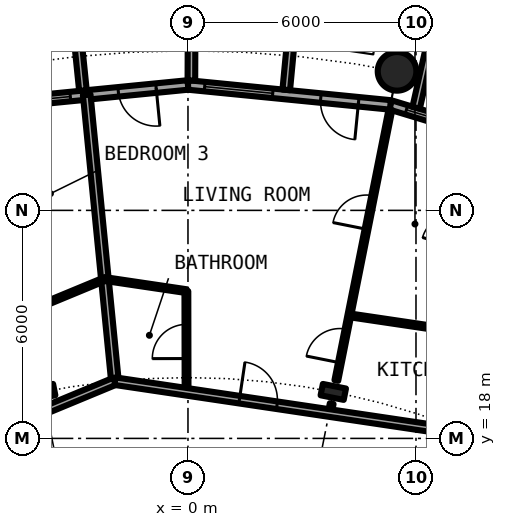
"""IFC4 building model, lengths in metres.
Left out: names, types, materials, properties, quantities, classifications, styles, units other than length and angle.
Written with IfcOpenShell. Run it as: python <this file> out.ifc"""

import sys

from ifc_helpers import new_model, si_unit, direction, frame, frame_2d, origin, origin_2d, place, context, subcontext, project, spatial, rectangle, hollow_circle, i_section, extrude, element, fill, save


model = new_model("IFC4")
c1 = context("Model", 3, precision=1e-05, world=origin(), true_north=direction((0.0, 1.0)))
c2 = subcontext(c1, "Body", "Model", "MODEL_VIEW")
j1 = project(units=[si_unit("LENGTHUNIT", "METRE"), si_unit("PLANEANGLEUNIT", "RADIAN")], contexts=[c1])
p1 = place(None, origin())
s1 = spatial("IfcSite", under=j1, at=p1, CompositionType="ELEMENT")
p2 = place(p1, origin())
s2 = spatial("IfcBuilding", under=s1, at=p2, CompositionType="ELEMENT")
p3 = place(p2, frame((0.0, 0.0, 50.25)))
s3 = spatial("IfcBuildingStorey", under=s2, at=p3, CompositionType="ELEMENT", Elevation=50.25)
p4 = place(p3, frame((5.501, 27.658, 0.0), z_axis=(0.0, 0.0, 1.0), x_axis=(1.0, 0.0, 0.0)))
e1 = element("IfcColumn", 1, at=p4, inside=s3, PredefinedType="COLUMN", context=c2, shape_type="SweptSolid", body=[
    extrude(hollow_circle(Radius=0.508, WallThickness=0.05, at=origin_2d()), origin(), (0.0, 0.0, 1.0), 3.05),
])
for number, where, z_axis, x_axis in (
    (2, (3.824, 19.223, 0.0), (0.0, 0.0, 1.0), (0.195, 0.981, 0.0)),
    (3, (-3.824, 19.223, 0.0), (0.0, 0.0, 1.0), (-0.195, 0.981, 0.0)),
):
    element("IfcColumn", number, at=place(p3, frame(where, z_axis=z_axis, x_axis=x_axis)), inside=s3, PredefinedType="COLUMN", context=c2, shape_type="SweptSolid", body=[
        extrude(i_section(OverallWidth=0.305, OverallDepth=0.62, WebThickness=0.021, FlangeThickness=0.04, FilletRadius=0.027, at=origin_2d()), origin(), (0.0, 0.0, 1.0), 3.05),
    ])
p5 = place(p3, frame((10.447, 25.222, 0.0), z_axis=(0.0, 0.0, 1.0), x_axis=(-0.956965678721, 0.290201119486, 0.0)))
e4 = element("IfcWall", 4, at=p5, inside=s3, PredefinedType="SOLIDWALL", context=c2, shape_type="SweptSolid", body=[
    extrude(rectangle(XDim=5.351, YDim=0.25, at=frame_2d((2.676, 0.0))), origin(), (0.0, 0.0, 1.0), 2.7),
])
p6 = place(p5, frame((0.841, 0.0, 0.0)))
e5 = element("IfcOpeningElement", 5, at=p6, cuts=e4, PredefinedType="OPENING", context=c2, shape_type="SweptSolid", body=[
    extrude(rectangle(XDim=1.0, YDim=2.2, at=frame_2d((0.5, 1.1))), frame((0.0, 0.135, 0.0), z_axis=(0.0, -1.0, 0.0), x_axis=(1.0, 0.0, 0.0)), (0.0, 0.0, 1.0), 0.27),
])
p7 = place(p5, frame((3.111, 0.0, 0.3)))
e6 = element("IfcOpeningElement", 6, at=p7, cuts=e4, PredefinedType="OPENING", context=c2, shape_type="SweptSolid", body=[
    extrude(rectangle(XDim=1.8, YDim=2.1, at=frame_2d((0.9, 1.05))), frame((0.0, 0.135, 0.0), z_axis=(0.0, -1.0, 0.0), x_axis=(1.0, 0.0, 0.0)), (0.0, 0.0, 1.0), 0.27),
])
p8 = place(p3, frame((6.004, 26.7, -0.03), z_axis=(0.0, 0.0, 1.0), x_axis=(0.219609259383, 0.975587911566, 0.0)))
e7 = element("IfcWall", 7, at=p8, inside=s3, PredefinedType="SOLIDWALL", context=c2, shape_type="SweptSolid", body=[
    extrude(rectangle(XDim=2.933, YDim=0.2, at=frame_2d((1.466, 0.0))), origin(), (0.0, 0.0, 1.0), 2.73),
])
p9 = place(p3, frame((5.326, 26.775, 0.0), z_axis=(0.0, 0.0, 1.0), x_axis=(-0.995173996315, 0.098126026407, 0.0)))
e8 = element("IfcWall", 8, at=p9, inside=s3, PredefinedType="SOLIDWALL", context=c2, shape_type="SweptSolid", body=[
    extrude(rectangle(XDim=5.352, YDim=0.25, at=frame_2d((2.676, 0.0))), origin(), (0.0, 0.0, 1.0), 2.7),
])
p10 = place(p9, frame((0.841, 0.0, 0.0)))
e9 = element("IfcOpeningElement", 9, at=p10, cuts=e8, PredefinedType="OPENING", context=c2, shape_type="SweptSolid", body=[
    extrude(rectangle(XDim=1.0, YDim=2.2, at=frame_2d((0.5, 1.1))), frame((0.0, 0.135, 0.0), z_axis=(0.0, -1.0, 0.0), x_axis=(1.0, 0.0, 0.0)), (0.0, 0.0, 1.0), 0.27),
])
p11 = place(p9, frame((3.111, 0.0, 0.3)))
e10 = element("IfcOpeningElement", 10, at=p11, cuts=e8, PredefinedType="OPENING", context=c2, shape_type="SweptSolid", body=[
    extrude(rectangle(XDim=1.8, YDim=2.1, at=frame_2d((0.9, 1.05))), frame((0.0, 0.135, 0.0), z_axis=(0.0, -1.0, 0.0), x_axis=(1.0, 0.0, 0.0)), (0.0, 0.0, 1.0), 0.27),
])
p12 = place(p3, frame((2.586, 27.171, -0.03), z_axis=(0.0, 0.0, 1.0), x_axis=(0.094548432284, 0.995520262954, 0.0)))
e11 = element("IfcWall", 11, at=p12, inside=s3, PredefinedType="SOLIDWALL", context=c2, shape_type="SweptSolid", body=[
    extrude(rectangle(XDim=3.006, YDim=0.2, at=frame_2d((1.503, 0.0))), origin(), (0.0, 0.0, 1.0), 2.73),
])
p13 = place(p3, frame((0.09, 27.417, -0.03), z_axis=(0.0, 0.0, 1.0), x_axis=(0.00347308367, 0.999993968827, 0.0)))
e12 = element("IfcWall", 12, at=p13, inside=s3, PredefinedType="SOLIDWALL", context=c2, shape_type="SweptSolid", body=[
    extrude(rectangle(XDim=2.882, YDim=0.2, at=frame_2d((1.441, 0.0))), origin(), (0.0, 0.0, 1.0), 2.73),
])
p14 = place(p3, frame((0.0, 27.3, 0.0), z_axis=(0.0, 0.0, 1.0), x_axis=(-0.995173996315, -0.098126026407, 0.0)))
e13 = element("IfcWall", 13, at=p14, inside=s3, PredefinedType="SOLIDWALL", context=c2, shape_type="SweptSolid", body=[
    extrude(rectangle(XDim=5.352, YDim=0.25, at=frame_2d((2.676, 0.0))), origin(), (0.0, 0.0, 1.0), 2.7),
])
p15 = place(p14, frame((0.841, 0.0, 0.0)))
e14 = element("IfcOpeningElement", 14, at=p15, cuts=e13, PredefinedType="OPENING", context=c2, shape_type="SweptSolid", body=[
    extrude(rectangle(XDim=1.0, YDim=2.2, at=frame_2d((0.5, 1.1))), frame((0.0, 0.135, 0.0), z_axis=(0.0, -1.0, 0.0), x_axis=(1.0, 0.0, 0.0)), (0.0, 0.0, 1.0), 0.27),
])
p16 = place(p14, frame((3.111, 0.0, 0.3)))
e15 = element("IfcOpeningElement", 15, at=p16, cuts=e13, PredefinedType="OPENING", context=c2, shape_type="SweptSolid", body=[
    extrude(rectangle(XDim=1.8, YDim=2.1, at=frame_2d((0.9, 1.05))), frame((0.0, 0.135, 0.0), z_axis=(0.0, -1.0, 0.0), x_axis=(1.0, 0.0, 0.0)), (0.0, 0.0, 1.0), 0.27),
])
p17 = place(p3, frame((-2.764, 27.153, -0.03), z_axis=(0.0, 0.0, 1.0), x_axis=(-0.101505487237, 0.994834979311, 0.0)))
e16 = element("IfcWall", 16, at=p17, inside=s3, PredefinedType="SOLIDWALL", context=c2, shape_type="SweptSolid", body=[
    extrude(rectangle(XDim=3.007, YDim=0.2, at=frame_2d((1.503, 0.0))), origin(), (0.0, 0.0, 1.0), 2.73),
])
p18 = place(p3, frame((-2.665, 27.044, 0.0), z_axis=(0.0, 0.0, 1.0), x_axis=(0.098083473227, -0.99517819122, 0.0)))
e17 = element("IfcWall", 17, at=p18, inside=s3, PredefinedType="PARTITIONING", context=c2, shape_type="SweptSolid", body=[
    extrude(rectangle(XDim=7.574, YDim=0.2, at=frame_2d((3.787, 0.0))), origin(), (0.0, 0.0, 1.0), 2.7),
])
p19 = place(p3, frame((-0.037, 19.226, 0.0), z_axis=(0.0, 0.0, 1.0), x_axis=(-0.001843314841, 0.999998301094, 0.0)))
e18 = element("IfcWall", 18, at=p19, inside=s3, PredefinedType="PARTITIONING", context=c2, shape_type="SweptSolid", body=[
    extrude(rectangle(XDim=2.649, YDim=0.1, at=frame_2d((1.324, 0.0))), origin(), (0.0, 0.0, 1.0), 2.7),
])
p20 = place(p19, frame((0.875, 0.0, 0.0)))
e19 = element("IfcOpeningElement", 19, at=p20, cuts=e18, PredefinedType="OPENING", context=c2, shape_type="SweptSolid", body=[
    extrude(rectangle(XDim=0.9, YDim=2.3, at=frame_2d((0.45, 1.15))), frame((0.0, 0.06, 0.0), z_axis=(0.0, -1.0, 0.0), x_axis=(1.0, 0.0, 0.0)), (0.0, 0.0, 1.0), 0.12),
])
p21 = place(p3, frame((3.733, 18.667, 0.0), z_axis=(0.0, 0.0, 1.0), x_axis=(0.193340656307, 0.981131688724, 0.0)))
e20 = element("IfcWall", 20, at=p21, inside=s3, PredefinedType="PARTITIONING", context=c2, shape_type="SweptSolid", body=[
    extrude(rectangle(XDim=0.254, YDim=0.1, at=frame_2d((0.127, 0.0))), origin(), (0.0, 0.0, 1.0), 2.7),
])
p22 = place(p3, frame((3.904, 19.524, 0.0), z_axis=(0.0, 0.0, 1.0), x_axis=(0.195857618189, 0.980632343642, 0.0)))
e21 = element("IfcWall", 21, at=p22, inside=s3, PredefinedType="PARTITIONING", context=c2, shape_type="SweptSolid", body=[
    extrude(rectangle(XDim=7.265, YDim=0.1, at=frame_2d((3.632, 0.0))), origin(), (0.0, 0.0, 1.0), 2.7),
])
p23 = place(p22, frame((0.476, 0.0, 0.0)))
e22 = element("IfcOpeningElement", 22, at=p23, cuts=e21, PredefinedType="OPENING", context=c2, shape_type="SweptSolid", body=[
    extrude(rectangle(XDim=0.9, YDim=2.3, at=frame_2d((0.45, 1.15))), frame((0.0, 0.06, 0.0), z_axis=(0.0, -1.0, 0.0), x_axis=(1.0, 0.0, 0.0)), (0.0, 0.0, 1.0), 0.12),
])
p24 = place(p22, frame((4.058, 0.0, 0.0)))
e23 = element("IfcOpeningElement", 23, at=p24, cuts=e21, PredefinedType="OPENING", context=c2, shape_type="SweptSolid", body=[
    extrude(rectangle(XDim=0.9, YDim=2.3, at=frame_2d((0.45, 1.15))), frame((0.0, 0.06, 0.0), z_axis=(0.0, -1.0, 0.0), x_axis=(1.0, 0.0, 0.0)), (0.0, 0.0, 1.0), 0.12),
])
p25 = place(p3, frame((-12.435, 15.15, 0.0), z_axis=(0.0, 0.0, 1.0), x_axis=(0.923845560554, 0.38276543763, 0.0)))
e24 = element("IfcWall", 24, at=p25, inside=s3, PredefinedType="PARTITIONING", context=c2, shape_type="SweptSolid", body=[
    extrude(rectangle(XDim=11.381, YDim=0.2, at=frame_2d((5.69, 0.0))), origin(), (0.0, 0.0, 1.0), 2.7),
])
p26 = place(p25, frame((3.293, 0.0, 0.0)))
e25 = element("IfcOpeningElement", 25, at=p26, cuts=e24, PredefinedType="OPENING", context=c2, shape_type="SweptSolid", body=[
    extrude(rectangle(XDim=1.0, YDim=2.3, at=frame_2d((0.5, 1.15))), frame((0.0, 0.11, 0.0), z_axis=(0.0, -1.0, 0.0), x_axis=(1.0, 0.0, 0.0)), (0.0, 0.0, 1.0), 0.22),
])
p27 = place(p3, frame((-1.921, 19.506, 0.0), z_axis=(0.0, 0.0, 1.0), x_axis=(0.989134446023, -0.147013767014, 0.0)))
e26 = element("IfcWall", 26, at=p27, inside=s3, PredefinedType="PARTITIONING", context=c2, shape_type="SweptSolid", body=[
    extrude(rectangle(XDim=9.531, YDim=0.2, at=frame_2d((4.765, 0.0))), origin(), (0.0, 0.0, 1.0), 2.38),
])
p28 = place(p27, frame((3.31, 0.0, 0.0)))
e27 = element("IfcOpeningElement", 27, at=p28, cuts=e26, PredefinedType="OPENING", context=c2, shape_type="SweptSolid", body=[
    extrude(rectangle(XDim=1.0, YDim=2.3, at=frame_2d((0.5, 1.15))), frame((0.0, 0.11, 0.0), z_axis=(0.0, -1.0, 0.0), x_axis=(1.0, 0.0, 0.0)), (0.0, 0.0, 1.0), 0.22),
])
p29 = place(p3, frame((-8.166, 19.715, 0.0), z_axis=(0.0, 0.0, 1.0), x_axis=(0.923844914631, 0.382766996632, 0.0)))
e28 = element("IfcWall", 28, at=p29, inside=s3, PredefinedType="PARTITIONING", context=c2, shape_type="SweptSolid", body=[
    extrude(rectangle(XDim=6.474, YDim=0.1, at=frame_2d((3.237, 0.0))), origin(), (0.0, 0.0, 1.0), 2.7),
])
p30 = place(p3, frame((-2.186, 22.193, 0.0), z_axis=(0.0, 0.0, 1.0), x_axis=(0.989171386505, -0.146765009863, 0.0)))
e29 = element("IfcWall", 29, at=p30, inside=s3, PredefinedType="PARTITIONING", context=c2, shape_type="SweptSolid", body=[
    extrude(rectangle(XDim=2.167, YDim=0.1, at=frame_2d((1.084, 0.0))), origin(), (0.0, 0.0, 1.0), 2.7),
])
p31 = place(p3, frame((4.246, 21.239, 0.0), z_axis=(0.0, 0.0, 1.0), x_axis=(0.989178348771, -0.146718077695, 0.0)))
e30 = element("IfcWall", 30, at=p31, inside=s3, PredefinedType="PARTITIONING", context=c2, shape_type="SweptSolid", body=[
    extrude(rectangle(XDim=4.335, YDim=0.1, at=frame_2d((2.167, 0.0))), origin(), (0.0, 0.0, 1.0), 2.7),
])
p32 = place(p7, origin())
e31 = element("IfcWindow", 31, at=p32, inside=s3, PartitioningType="SINGLE_PANEL", PredefinedType="WINDOW", context=c2, shape_type="SweptSolid", body=[
    extrude(rectangle(XDim=1.8, YDim=2.1, at=frame_2d((0.9, 1.05))), frame((0.0, 0.03, 0.0), z_axis=(0.0, -1.0, 0.0), x_axis=(1.0, 0.0, 0.0)), (0.0, 0.0, 1.0), 0.06),
])
fill(e6, e31)
p33 = place(p10, origin())
e32 = element("IfcDoor", 32, at=p33, inside=s3, OperationType="SINGLE_SWING_LEFT", PredefinedType="DOOR", context=c2, shape_type="SweptSolid", body=[
    extrude(rectangle(XDim=1.0, YDim=2.2, at=frame_2d((0.5, 1.1))), frame((0.0, 0.025, 0.0), z_axis=(0.0, -1.0, 0.0), x_axis=(1.0, 0.0, 0.0)), (0.0, 0.0, 1.0), 0.05),
])
fill(e9, e32)
p34 = place(p11, origin())
e33 = element("IfcWindow", 33, at=p34, inside=s3, PartitioningType="SINGLE_PANEL", PredefinedType="WINDOW", context=c2, shape_type="SweptSolid", body=[
    extrude(rectangle(XDim=1.8, YDim=2.1, at=frame_2d((0.9, 1.05))), frame((0.0, 0.03, 0.0), z_axis=(0.0, -1.0, 0.0), x_axis=(1.0, 0.0, 0.0)), (0.0, 0.0, 1.0), 0.06),
])
fill(e10, e33)
p35 = place(p15, origin())
e34 = element("IfcDoor", 34, at=p35, inside=s3, OperationType="SINGLE_SWING_LEFT", PredefinedType="DOOR", context=c2, shape_type="SweptSolid", body=[
    extrude(rectangle(XDim=1.0, YDim=2.2, at=frame_2d((0.5, 1.1))), frame((0.0, 0.025, 0.0), z_axis=(0.0, -1.0, 0.0), x_axis=(1.0, 0.0, 0.0)), (0.0, 0.0, 1.0), 0.05),
])
fill(e14, e34)
p36 = place(p16, origin())
e35 = element("IfcWindow", 35, at=p36, inside=s3, PartitioningType="SINGLE_PANEL", PredefinedType="WINDOW", context=c2, shape_type="SweptSolid", body=[
    extrude(rectangle(XDim=1.8, YDim=2.1, at=frame_2d((0.9, 1.05))), frame((0.0, 0.03, 0.0), z_axis=(0.0, -1.0, 0.0), x_axis=(1.0, 0.0, 0.0)), (0.0, 0.0, 1.0), 0.06),
])
fill(e15, e35)
p37 = place(p28, origin())
e36 = element("IfcDoor", 36, at=p37, inside=s3, OperationType="SINGLE_SWING_LEFT", PredefinedType="DOOR", context=c2, shape_type="SweptSolid", body=[
    extrude(rectangle(XDim=1.0, YDim=2.3, at=frame_2d((0.5, 1.15))), frame((0.0, 0.025, 0.0), z_axis=(0.0, -1.0, 0.0), x_axis=(1.0, 0.0, 0.0)), (0.0, 0.0, 1.0), 0.05),
])
fill(e27, e36)
p38 = place(p20, origin())
e37 = element("IfcDoor", 37, at=p38, inside=s3, OperationType="SINGLE_SWING_RIGHT", PredefinedType="DOOR", context=c2, shape_type="SweptSolid", body=[
    extrude(rectangle(XDim=0.9, YDim=2.3, at=frame_2d((0.45, 1.15))), frame((0.0, 0.025, 0.0), z_axis=(0.0, -1.0, 0.0), x_axis=(1.0, 0.0, 0.0)), (0.0, 0.0, 1.0), 0.05),
])
fill(e19, e37)
p39 = place(p23, origin())
e38 = element("IfcDoor", 38, at=p39, inside=s3, OperationType="SINGLE_SWING_LEFT", PredefinedType="DOOR", context=c2, shape_type="SweptSolid", body=[
    extrude(rectangle(XDim=0.9, YDim=2.3, at=frame_2d((0.45, 1.15))), frame((0.0, 0.025, 0.0), z_axis=(0.0, -1.0, 0.0), x_axis=(1.0, 0.0, 0.0)), (0.0, 0.0, 1.0), 0.05),
])
fill(e22, e38)
p40 = place(p24, origin())
e39 = element("IfcDoor", 39, at=p40, inside=s3, OperationType="SINGLE_SWING_RIGHT", PredefinedType="DOOR", context=c2, shape_type="SweptSolid", body=[
    extrude(rectangle(XDim=0.9, YDim=2.3, at=frame_2d((0.45, 1.15))), frame((0.0, 0.025, 0.0), z_axis=(0.0, -1.0, 0.0), x_axis=(1.0, 0.0, 0.0)), (0.0, 0.0, 1.0), 0.05),
])
fill(e23, e39)
save(model, sys.argv[1])
